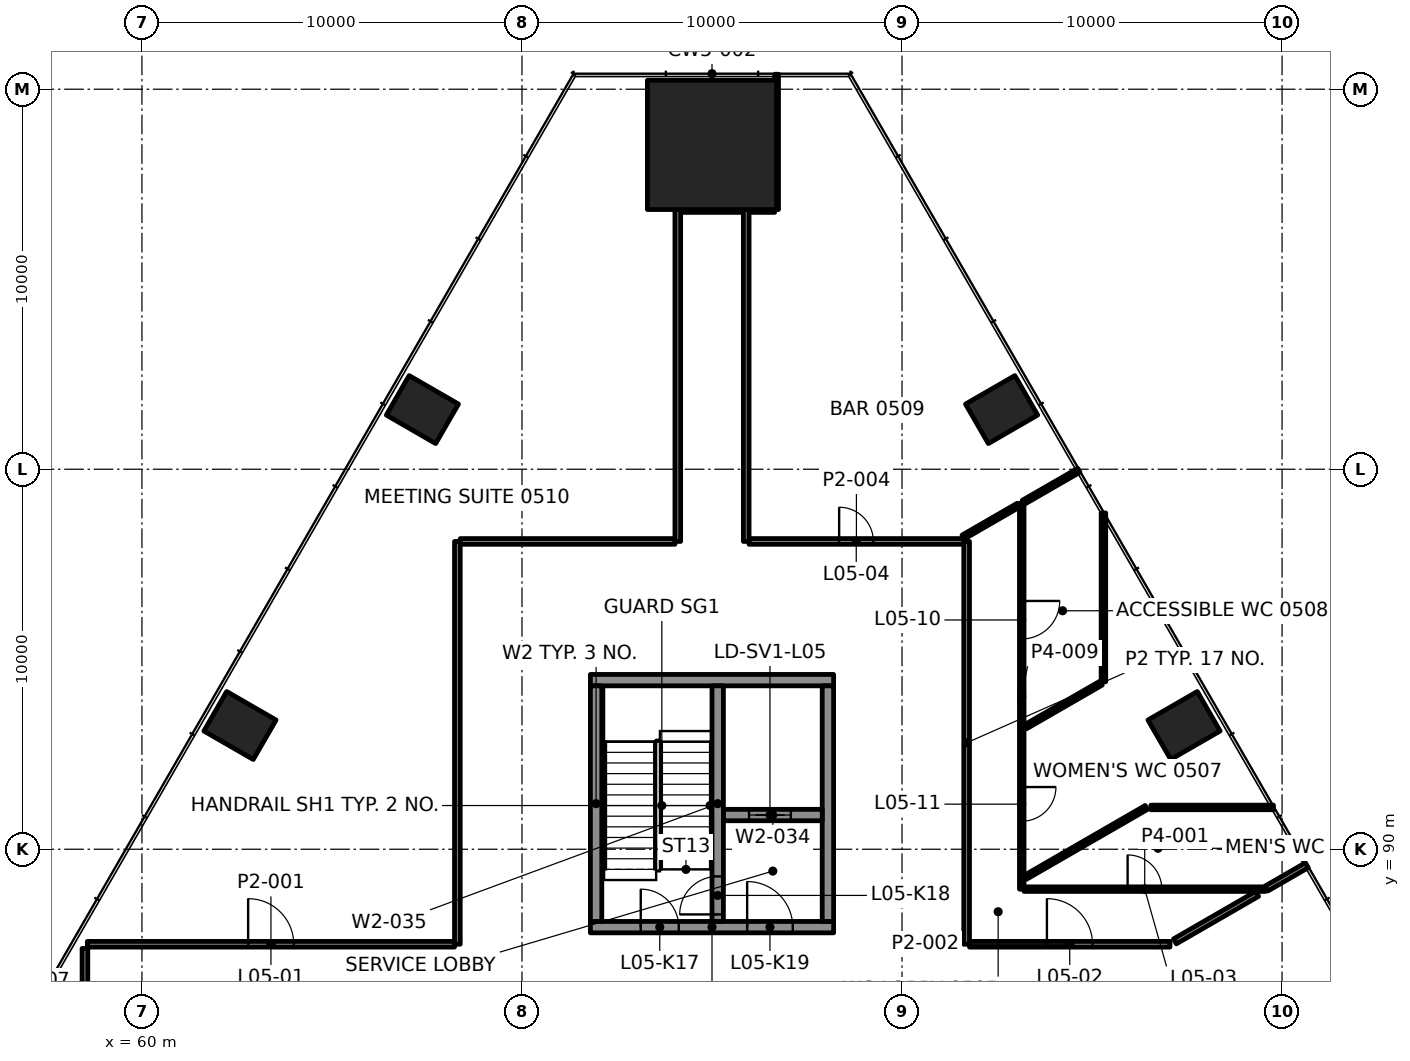
"""IFC4 building model, lengths in metres.
Left out: names, types, materials, properties, quantities, classifications, styles, units other than length and angle.
Written with IfcOpenShell. Run it as: python <this file> out.ifc"""

import sys

from ifc_helpers import new_model, si_unit, direction, frame, frame_2d, origin, origin_2d, place, context, subcontext, project, spatial, rectangle, extrude, element, fill, save


model = new_model("IFC4")
c1 = context("Model", 3, precision=1e-05, world=origin(), true_north=direction((0.0, 1.0)))
c2 = subcontext(c1, "Body", "Model", "MODEL_VIEW")
j1 = project(units=[si_unit("LENGTHUNIT", "METRE"), si_unit("PLANEANGLEUNIT", "RADIAN")], contexts=[c1])
p1 = place(None, origin())
s1 = spatial("IfcSite", under=j1, at=p1, CompositionType="ELEMENT")
p2 = place(p1, origin())
s2 = spatial("IfcBuilding", under=s1, at=p2, CompositionType="ELEMENT")
p3 = place(p2, frame((0.0, 0.0, 26.4)))
s3 = spatial("IfcBuildingStorey", under=s2, at=p3, CompositionType="ELEMENT", Elevation=26.4)
p4 = place(p3, frame((75.0, 108.534, 0.0), z_axis=(0.0, 0.0, 1.0), x_axis=(-1.0, 0.0, 0.0)))
e1 = element("IfcColumn", 1, at=p4, inside=s3, PredefinedType="COLUMN", context=c2, shape_type="SweptSolid", body=[
    extrude(rectangle(XDim=3.4, YDim=3.4, at=origin_2d()), origin(), (0.0, 0.0, 1.0), 4.6),
])
for number, where, z_axis, x_axis in (
    (2, (87.421, 93.256, -0.0), (0.0, 0.0, 1.0), (-0.5, 0.866, 0.0)),
    (3, (82.621, 101.57, -0.0), (0.0, 0.0, 1.0), (-0.5, 0.866, 0.0)),
    (4, (67.379, 101.57, -0.0), (0.0, 0.0, 1.0), (-0.5, -0.866, 0.0)),
    (5, (62.579, 93.256, -0.0), (0.0, 0.0, 1.0), (-0.5, -0.866, 0.0)),
):
    element("IfcColumn", number, at=place(p3, frame(where, z_axis=z_axis, x_axis=x_axis)), inside=s3, PredefinedType="COLUMN", context=c2, shape_type="SweptSolid", body=[
        extrude(rectangle(XDim=1.2, YDim=1.5, at=origin_2d()), origin(), (0.0, 0.0, 1.0), 4.6),
    ])
p5 = place(p3, frame((71.8, 87.95, 0.0), z_axis=(0.0, 0.0, 1.0), x_axis=(1.0, 0.0, 0.0)))
e6 = element("IfcWall", 6, at=p5, inside=s3, PredefinedType="SHEAR", context=c2, shape_type="SweptSolid", body=[
    extrude(rectangle(XDim=6.4, YDim=0.3, at=frame_2d((3.2, 0.0))), origin(), (0.0, 0.0, 1.0), 4.15),
])
p6 = place(p5, frame((1.325, 0.0, 0.0)))
e7 = element("IfcOpeningElement", 7, at=p6, cuts=e6, PredefinedType="OPENING", context=c2, shape_type="SweptSolid", body=[
    extrude(rectangle(XDim=1.0, YDim=2.1, at=frame_2d((0.5, 1.05))), frame((0.0, 0.16, 0.0), z_axis=(0.0, -1.0, 0.0), x_axis=(1.0, 0.0, 0.0)), (0.0, 0.0, 1.0), 0.32),
])
p7 = place(p5, frame((4.125, 0.0, 0.0)))
e8 = element("IfcOpeningElement", 8, at=p7, cuts=e6, PredefinedType="OPENING", context=c2, shape_type="SweptSolid", body=[
    extrude(rectangle(XDim=1.2, YDim=2.1, at=frame_2d((0.6, 1.05))), frame((0.0, 0.16, 0.0), z_axis=(0.0, -1.0, 0.0), x_axis=(1.0, 0.0, 0.0)), (0.0, 0.0, 1.0), 0.32),
])
p8 = place(p3, frame((71.8, 94.45, 0.0), z_axis=(0.0, 0.0, 1.0), x_axis=(1.0, 0.0, 0.0)))
e9 = element("IfcWall", 9, at=p8, inside=s3, PredefinedType="SHEAR", context=c2, shape_type="SweptSolid", body=[
    extrude(rectangle(XDim=6.4, YDim=0.3, at=frame_2d((3.2, 0.0))), origin(), (0.0, 0.0, 1.0), 4.15),
])
for number, where, z_axis, x_axis in (
    (10, (71.95, 88.1, 0.0), (0.0, 0.0, 1.0), (0.0, 1.0, 0.0)),
    (11, (78.05, 88.1, 0.0), (0.0, 0.0, 1.0), (0.0, 1.0, 0.0)),
):
    element("IfcWall", number, at=place(p3, frame(where, z_axis=z_axis, x_axis=x_axis)), inside=s3, PredefinedType="SHEAR", context=c2, shape_type="SweptSolid", body=[
        extrude(rectangle(XDim=6.2, YDim=0.3, at=frame_2d((3.1, 0.0))), origin(), (0.0, 0.0, 1.0), 4.15),
    ])
p9 = place(p3, frame((75.3, 90.9, 0.0), z_axis=(0.0, 0.0, 1.0), x_axis=(1.0, 0.0, 0.0)))
e12 = element("IfcWall", 12, at=p9, inside=s3, PredefinedType="SHEAR", context=c2, shape_type="SweptSolid", body=[
    extrude(rectangle(XDim=2.6, YDim=0.3, at=frame_2d((1.3, 0.0))), origin(), (0.0, 0.0, 1.0), 4.15),
])
p10 = place(p9, frame((0.675, 0.0, 0.0)))
e13 = element("IfcOpeningElement", 13, at=p10, cuts=e12, PredefinedType="OPENING", context=c2, shape_type="SweptSolid", body=[
    extrude(rectangle(XDim=1.1, YDim=2.1, at=frame_2d((0.55, 1.05))), frame((0.0, 0.16, 0.0), z_axis=(0.0, -1.0, 0.0), x_axis=(1.0, 0.0, 0.0)), (0.0, 0.0, 1.0), 0.32),
])
p11 = place(p3, frame((75.15, 88.1, 0.0), z_axis=(0.0, 0.0, 1.0), x_axis=(0.0, 1.0, 0.0)))
e14 = element("IfcWall", 14, at=p11, inside=s3, PredefinedType="SHEAR", context=c2, shape_type="SweptSolid", body=[
    extrude(rectangle(XDim=6.2, YDim=0.3, at=frame_2d((3.1, 0.0))), origin(), (0.0, 0.0, 1.0), 4.15),
])
p12 = place(p11, frame((0.185, 0.0, 0.0)))
e15 = element("IfcOpeningElement", 15, at=p12, cuts=e14, PredefinedType="OPENING", context=c2, shape_type="SweptSolid", body=[
    extrude(rectangle(XDim=1.0, YDim=2.1, at=frame_2d((0.5, 1.05))), frame((0.0, 0.16, 0.0), z_axis=(0.0, -1.0, 0.0), x_axis=(1.0, 0.0, 0.0)), (0.0, 0.0, 1.0), 0.32),
])
p13 = place(p3, frame((58.563, 87.5, 0.0), z_axis=(0.0, 0.0, 1.0), x_axis=(1.0, 0.0, 0.0)))
e16 = element("IfcWall", 16, at=p13, inside=s3, PredefinedType="PARTITIONING", context=c2, shape_type="SweptSolid", body=[
    extrude(rectangle(XDim=9.662, YDim=0.15, at=frame_2d((4.831, 0.0))), origin(), (0.0, 0.0, 1.0), 3.315),
])
p14 = place(p13, frame((4.231, 0.0, 0.0)))
e17 = element("IfcOpeningElement", 17, at=p14, cuts=e16, PredefinedType="OPENING", context=c2, shape_type="SweptSolid", body=[
    extrude(rectangle(XDim=1.2, YDim=2.1, at=frame_2d((0.6, 1.05))), frame((0.0, 0.085, 0.0), z_axis=(0.0, -1.0, 0.0), x_axis=(1.0, 0.0, 0.0)), (0.0, 0.0, 1.0), 0.17),
])
p15 = place(p3, frame((81.775, 87.5, 0.0), z_axis=(0.0, 0.0, 1.0), x_axis=(1.0, 0.0, 0.0)))
e18 = element("IfcWall", 18, at=p15, inside=s3, PredefinedType="PARTITIONING", context=c2, shape_type="SweptSolid", body=[
    extrude(rectangle(XDim=5.276, YDim=0.15, at=frame_2d((2.638, 0.0))), origin(), (0.0, 0.0, 1.0), 3.55),
])
p16 = place(p15, frame((2.038, 0.0, 0.0)))
e19 = element("IfcOpeningElement", 19, at=p16, cuts=e18, PredefinedType="OPENING", context=c2, shape_type="SweptSolid", body=[
    extrude(rectangle(XDim=1.2, YDim=2.1, at=frame_2d((0.6, 1.05))), frame((0.0, 0.085, 0.0), z_axis=(0.0, -1.0, 0.0), x_axis=(1.0, 0.0, 0.0)), (0.0, 0.0, 1.0), 0.17),
])
p17 = place(p3, frame((83.21, 88.95, 0.0), z_axis=(0.0, 0.0, 1.0), x_axis=(1.0, 0.0, 0.0)))
e20 = element("IfcWall", 20, at=p17, inside=s3, PredefinedType="PARTITIONING", context=c2, shape_type="SweptSolid", body=[
    extrude(rectangle(XDim=6.352, YDim=0.12, at=frame_2d((3.176, 0.0))), origin(), (0.0, 0.0, 1.0), 3.55),
])
p18 = place(p17, frame((2.726, 0.0, 0.0)))
e21 = element("IfcOpeningElement", 21, at=p18, cuts=e20, PredefinedType="OPENING", context=c2, shape_type="SweptSolid", body=[
    extrude(rectangle(XDim=0.9, YDim=2.1, at=frame_2d((0.45, 1.05))), frame((0.0, 0.07, 0.0), z_axis=(0.0, -1.0, 0.0), x_axis=(1.0, 0.0, 0.0)), (0.0, 0.0, 1.0), 0.14),
])
p19 = place(p3, frame((86.549, 91.1, 0.0), z_axis=(0.0, 0.0, 1.0), x_axis=(1.0, 0.0, 0.0)))
e22 = element("IfcWall", 22, at=p19, inside=s3, PredefinedType="PARTITIONING", context=c2, shape_type="SweptSolid", body=[
    extrude(rectangle(XDim=3.225, YDim=0.12, at=frame_2d((1.612, 0.0))), origin(), (0.0, 0.0, 1.0), 3.315),
])
p20 = place(p3, frame((68.375, 98.1, 0.0), z_axis=(0.0, 0.0, 1.0), x_axis=(1.0, 0.0, 0.0)))
e23 = element("IfcWall", 23, at=p20, inside=s3, PredefinedType="PARTITIONING", context=c2, shape_type="SweptSolid", body=[
    extrude(rectangle(XDim=5.649, YDim=0.15, at=frame_2d((2.825, 0.0))), origin(), (0.0, 0.0, 1.0), 3.55),
])
p21 = place(p3, frame((75.975, 98.1, 0.0), z_axis=(0.0, 0.0, 1.0), x_axis=(1.0, 0.0, 0.0)))
e24 = element("IfcWall", 24, at=p21, inside=s3, PredefinedType="PARTITIONING", context=c2, shape_type="SweptSolid", body=[
    extrude(rectangle(XDim=5.65, YDim=0.15, at=frame_2d((2.825, 0.0))), origin(), (0.0, 0.0, 1.0), 3.55),
])
p22 = place(p21, frame((2.371, 0.0, 0.0)))
e25 = element("IfcOpeningElement", 25, at=p22, cuts=e24, PredefinedType="OPENING", context=c2, shape_type="SweptSolid", body=[
    extrude(rectangle(XDim=0.9, YDim=2.1, at=frame_2d((0.45, 1.05))), frame((0.0, 0.085, 0.0), z_axis=(0.0, -1.0, 0.0), x_axis=(1.0, 0.0, 0.0)), (0.0, 0.0, 1.0), 0.17),
])
p23 = place(p3, frame((74.176, 106.834, 0.0), z_axis=(0.0, 0.0, 1.0), x_axis=(1.0, 0.0, 0.0)))
e26 = element("IfcWall", 26, at=p23, inside=s3, PredefinedType="PARTITIONING", context=c2, shape_type="SweptSolid", body=[
    extrude(rectangle(XDim=1.649, YDim=0.15, at=frame_2d((0.825, 0.0))), origin(), (0.0, 0.0, 1.0), 3.547),
])
p24 = place(p3, frame((87.18, 87.575, 0.0), z_axis=(0.0, 0.0, 1.0), x_axis=(0.866065245018, 0.499930986609, 0.0)))
e27 = element("IfcWall", 27, at=p24, inside=s3, PredefinedType="PARTITIONING", context=c2, shape_type="SweptSolid", body=[
    extrude(rectangle(XDim=2.5, YDim=0.15, at=frame_2d((1.25, 0.0))), origin(), (0.0, 0.0, 1.0), 3.55),
])
p25 = place(p3, frame((83.245, 89.261, 0.0), z_axis=(0.0, 0.0, 1.0), x_axis=(0.866019716681, 0.500009850223, 0.0)))
e28 = element("IfcWall", 28, at=p25, inside=s3, PredefinedType="PARTITIONING", context=c2, shape_type="SweptSolid", body=[
    extrude(rectangle(XDim=3.677, YDim=0.12, at=frame_2d((1.838, 0.0))), origin(), (0.0, 0.0, 1.0), 3.55),
])
p26 = place(p3, frame((83.245, 93.22, 0.0), z_axis=(0.0, 0.0, 1.0), x_axis=(0.866010893236, 0.500025132165, 0.0)))
e29 = element("IfcWall", 29, at=p26, inside=s3, PredefinedType="PARTITIONING", context=c2, shape_type="SweptSolid", body=[
    extrude(rectangle(XDim=2.304, YDim=0.12, at=frame_2d((1.152, 0.0))), origin(), (0.0, 0.0, 1.0), 3.55),
])
p27 = place(p3, frame((81.61, 98.215, 0.0), z_axis=(0.0, 0.0, 1.0), x_axis=(0.866027799164, 0.499995851058, 0.0)))
e30 = element("IfcWall", 30, at=p27, inside=s3, PredefinedType="PARTITIONING", context=c2, shape_type="SweptSolid", body=[
    extrude(rectangle(XDim=1.675, YDim=0.12, at=frame_2d((0.837, 0.0))), origin(), (0.0, 0.0, 1.0), 3.55),
])
p28 = place(p3, frame((85.3, 94.407, 0.0), z_axis=(0.0, 0.0, 1.0), x_axis=(0.0, 1.0, 0.0)))
e31 = element("IfcWall", 31, at=p28, inside=s3, PredefinedType="PARTITIONING", context=c2, shape_type="SweptSolid", body=[
    extrude(rectangle(XDim=4.442, YDim=0.12, at=frame_2d((2.221, 0.0))), origin(), (0.0, 0.0, 1.0), 3.315),
])
p29 = place(p3, frame((83.15, 99.104, 0.0), z_axis=(0.0, 0.0, 1.0), x_axis=(0.0, -1.0, 0.0)))
e32 = element("IfcWall", 32, at=p29, inside=s3, PredefinedType="PARTITIONING", context=c2, shape_type="SweptSolid", body=[
    extrude(rectangle(XDim=10.155, YDim=0.12, at=frame_2d((5.077, 0.0))), origin(), (0.0, 0.0, 1.0), 3.55),
])
p30 = place(p29, frame((2.571, 0.0, 0.0)))
e33 = element("IfcOpeningElement", 33, at=p30, cuts=e32, PredefinedType="OPENING", context=c2, shape_type="SweptSolid", body=[
    extrude(rectangle(XDim=1.0, YDim=2.1, at=frame_2d((0.5, 1.05))), frame((0.0, 0.07, 0.0), z_axis=(0.0, -1.0, 0.0), x_axis=(1.0, 0.0, 0.0)), (0.0, 0.0, 1.0), 0.14),
])
p31 = place(p29, frame((7.468, 0.0, 0.0)))
e34 = element("IfcOpeningElement", 34, at=p31, cuts=e32, PredefinedType="OPENING", context=c2, shape_type="SweptSolid", body=[
    extrude(rectangle(XDim=0.9, YDim=2.1, at=frame_2d((0.45, 1.05))), frame((0.0, 0.07, 0.0), z_axis=(0.0, -1.0, 0.0), x_axis=(1.0, 0.0, 0.0)), (0.0, 0.0, 1.0), 0.14),
])
p32 = place(p3, frame((81.7, 87.5, 0.0), z_axis=(0.0, 0.0, 1.0), x_axis=(0.0, 1.0, 0.0)))
e35 = element("IfcWall", 35, at=p32, inside=s3, PredefinedType="PARTITIONING", context=c2, shape_type="SweptSolid", body=[
    extrude(rectangle(XDim=10.6, YDim=0.15, at=frame_2d((5.3, 0.0))), origin(), (0.0, 0.0, 1.0), 3.55),
])
p33 = place(p3, frame((76.7, 106.834, 0.0), z_axis=(0.0, 0.0, 1.0), x_axis=(0.0, 1.0, 0.0)))
e36 = element("IfcWall", 36, at=p33, inside=s3, PredefinedType="PARTITIONING", context=c2, shape_type="SweptSolid", body=[
    extrude(rectangle(XDim=3.56, YDim=0.1, at=frame_2d((1.78, 0.0))), origin(), (0.0, 0.0, 1.0), 3.55),
])
p34 = place(p3, frame((75.9, 98.1, 0.0), z_axis=(0.0, 0.0, 1.0), x_axis=(0.0, 1.0, 0.0)))
e37 = element("IfcWall", 37, at=p34, inside=s3, PredefinedType="PARTITIONING", context=c2, shape_type="SweptSolid", body=[
    extrude(rectangle(XDim=8.734, YDim=0.15, at=frame_2d((4.367, 0.0))), origin(), (0.0, 0.0, 1.0), 3.55),
])
p35 = place(p3, frame((74.1, 98.1, 0.0), z_axis=(0.0, 0.0, 1.0), x_axis=(0.0, 1.0, 0.0)))
e38 = element("IfcWall", 38, at=p35, inside=s3, PredefinedType="PARTITIONING", context=c2, shape_type="SweptSolid", body=[
    extrude(rectangle(XDim=8.733, YDim=0.15, at=frame_2d((4.367, 0.0))), origin(), (0.0, 0.0, 1.0), 3.55),
])
p36 = place(p3, frame((68.3, 87.5, 0.0), z_axis=(0.0, 0.0, 1.0), x_axis=(0.0, 1.0, 0.0)))
e39 = element("IfcWall", 39, at=p36, inside=s3, PredefinedType="PARTITIONING", context=c2, shape_type="SweptSolid", body=[
    extrude(rectangle(XDim=10.599, YDim=0.15, at=frame_2d((5.3, 0.0))), origin(), (0.0, 0.0, 1.0), 3.55),
])
p37 = place(p3, frame((58.5, 85.219, 0.0), z_axis=(0.0, 0.0, 1.0), x_axis=(0.0, 1.0, 0.0)))
e40 = element("IfcWall", 40, at=p37, inside=s3, PredefinedType="PARTITIONING", context=c2, shape_type="SweptSolid", body=[
    extrude(rectangle(XDim=2.17, YDim=0.15, at=frame_2d((1.085, 0.0))), origin(), (0.0, 0.0, 1.0), 3.315),
])
p38 = place(p3, frame((89.588, 88.965, 0.0), z_axis=(0.0, 0.0, 1.0), x_axis=(0.865983670182, 0.500072277755, 0.0)))
e41 = element("IfcWall", 41, at=p38, inside=s3, PredefinedType="PARTITIONING", context=c2, shape_type="SweptSolid", body=[
    extrude(rectangle(XDim=1.228, YDim=0.15, at=frame_2d((0.614, 0.0))), origin(), (0.0, 0.0, 1.0), 3.315),
])
p39 = place(p3, frame((75.975, 106.834, 0.0), z_axis=(0.0, 0.0, 1.0), x_axis=(1.0, 0.0, 0.0)))
e42 = element("IfcWall", 42, at=p39, inside=s3, PredefinedType="PARTITIONING", context=c2, shape_type="SweptSolid", body=[
    extrude(rectangle(XDim=0.674, YDim=0.15, at=frame_2d((0.337, 0.0))), origin(), (0.0, 0.0, 1.0), 3.55),
])
p40 = place(p3, frame((83.195, 99.13, 0.0), z_axis=(0.0, 0.0, 1.0), x_axis=(0.865965639045, 0.500103501282, 0.0)))
e43 = element("IfcWall", 43, at=p40, inside=s3, PredefinedType="PARTITIONING", context=c2, shape_type="SweptSolid", body=[
    extrude(rectangle(XDim=1.682, YDim=0.12, at=frame_2d((0.841, 0.0))), origin(), (0.0, 0.0, 1.0), 3.315),
])
p41 = place(p3, frame((107.02, 62.31, 0.0), z_axis=(0.0, 0.0, 1.0), x_axis=(-0.49999992739, 0.866025445706, 0.0)))
e44 = element("IfcWall", 44, at=p41, inside=s3, PredefinedType="PARAPET", context=c2, shape_type="SweptSolid", body=[
    extrude(rectangle(XDim=54.0, YDim=0.2, at=frame_2d((27.0, 0.0))), origin(), (0.0, 0.0, 1.0), 1.1),
])
p42 = place(p3, frame((80.156, 109.038, 0.0), z_axis=(0.0, 0.0, 1.0), x_axis=(0.866024059345, 0.50000232863, 0.0)))
e45 = element("IfcWall", 45, at=p42, inside=s3, PredefinedType="PARAPET", context=c2, shape_type="SweptSolid", body=[
    extrude(rectangle(XDim=29.6, YDim=0.2, at=frame_2d((14.8, 0.0))), origin(), (0.0, 0.0, 1.0), 1.1),
])
p43 = place(p14, origin())
e46 = element("IfcDoor", 46, at=p43, inside=s3, OperationType="DOUBLE_DOOR_SINGLE_SWING", PredefinedType="DOOR", context=c2, shape_type="SweptSolid", body=[
    extrude(rectangle(XDim=1.2, YDim=2.1, at=frame_2d((0.6, 1.05))), frame((0.0, 0.025, 0.0), z_axis=(0.0, -1.0, 0.0), x_axis=(1.0, 0.0, 0.0)), (0.0, 0.0, 1.0), 0.05),
])
fill(e17, e46)
p44 = place(p16, origin())
e47 = element("IfcDoor", 47, at=p44, inside=s3, OperationType="DOUBLE_DOOR_SINGLE_SWING", PredefinedType="DOOR", context=c2, shape_type="SweptSolid", body=[
    extrude(rectangle(XDim=1.2, YDim=2.1, at=frame_2d((0.6, 1.05))), frame((0.0, 0.025, 0.0), z_axis=(0.0, -1.0, 0.0), x_axis=(1.0, 0.0, 0.0)), (0.0, 0.0, 1.0), 0.05),
])
fill(e19, e47)
p45 = place(p18, origin())
e48 = element("IfcDoor", 48, at=p45, inside=s3, OperationType="SINGLE_SWING_LEFT", PredefinedType="DOOR", context=c2, shape_type="SweptSolid", body=[
    extrude(rectangle(XDim=0.9, YDim=2.1, at=frame_2d((0.45, 1.05))), frame((0.0, 0.025, 0.0), z_axis=(0.0, -1.0, 0.0), x_axis=(1.0, 0.0, 0.0)), (0.0, 0.0, 1.0), 0.05),
])
fill(e21, e48)
p46 = place(p22, origin())
e49 = element("IfcDoor", 49, at=p46, inside=s3, OperationType="SINGLE_SWING_RIGHT", PredefinedType="DOOR", context=c2, shape_type="SweptSolid", body=[
    extrude(rectangle(XDim=0.9, YDim=2.1, at=frame_2d((0.45, 1.05))), frame((0.0, 0.025, 0.0), z_axis=(0.0, -1.0, 0.0), x_axis=(1.0, 0.0, 0.0)), (0.0, 0.0, 1.0), 0.05),
])
fill(e25, e49)
p47 = place(p30, origin())
e50 = element("IfcDoor", 50, at=p47, inside=s3, OperationType="SINGLE_SWING_RIGHT", PredefinedType="DOOR", context=c2, shape_type="SweptSolid", body=[
    extrude(rectangle(XDim=1.0, YDim=2.1, at=frame_2d((0.5, 1.05))), frame((0.0, 0.025, 0.0), z_axis=(0.0, -1.0, 0.0), x_axis=(1.0, 0.0, 0.0)), (0.0, 0.0, 1.0), 0.05),
])
fill(e33, e50)
p48 = place(p31, origin())
e51 = element("IfcDoor", 51, at=p48, inside=s3, OperationType="SINGLE_SWING_LEFT", PredefinedType="DOOR", context=c2, shape_type="SweptSolid", body=[
    extrude(rectangle(XDim=0.9, YDim=2.1, at=frame_2d((0.45, 1.05))), frame((0.0, 0.025, 0.0), z_axis=(0.0, -1.0, 0.0), x_axis=(1.0, 0.0, 0.0)), (0.0, 0.0, 1.0), 0.05),
])
fill(e34, e51)
p49 = place(p10, origin())
e52 = element("IfcDoor", 52, at=p49, inside=s3, OperationType="DOUBLE_DOOR_SLIDING", PredefinedType="DOOR", context=c2, shape_type="SweptSolid", body=[
    extrude(rectangle(XDim=1.1, YDim=2.1, at=frame_2d((0.55, 1.05))), frame((0.0, 0.025, 0.0), z_axis=(0.0, -1.0, 0.0), x_axis=(1.0, 0.0, 0.0)), (0.0, 0.0, 1.0), 0.05),
])
fill(e13, e52)
p50 = place(p6, origin())
e53 = element("IfcDoor", 53, at=p50, inside=s3, OperationType="SINGLE_SWING_RIGHT", PredefinedType="DOOR", context=c2, shape_type="SweptSolid", body=[
    extrude(rectangle(XDim=1.0, YDim=2.1, at=frame_2d((0.5, 1.05))), frame((0.0, 0.025, 0.0), z_axis=(0.0, -1.0, 0.0), x_axis=(1.0, 0.0, 0.0)), (0.0, 0.0, 1.0), 0.05),
])
fill(e7, e53)
p51 = place(p12, origin())
e54 = element("IfcDoor", 54, at=p51, inside=s3, OperationType="SINGLE_SWING_LEFT", PredefinedType="DOOR", context=c2, shape_type="SweptSolid", body=[
    extrude(rectangle(XDim=1.0, YDim=2.1, at=frame_2d((0.5, 1.05))), frame((0.0, 0.025, 0.0), z_axis=(0.0, -1.0, 0.0), x_axis=(1.0, 0.0, 0.0)), (0.0, 0.0, 1.0), 0.05),
])
fill(e15, e54)
p52 = place(p7, origin())
e55 = element("IfcDoor", 55, at=p52, inside=s3, OperationType="SINGLE_SWING_RIGHT", PredefinedType="DOOR", context=c2, shape_type="SweptSolid", body=[
    extrude(rectangle(XDim=1.2, YDim=2.1, at=frame_2d((0.6, 1.05))), frame((0.0, 0.025, 0.0), z_axis=(0.0, -1.0, 0.0), x_axis=(1.0, 0.0, 0.0)), (0.0, 0.0, 1.0), 0.05),
])
fill(e8, e55)
p53 = place(p3, frame((0.0, 0.0, -0.3)))
p54 = place(p53, frame((82.279, 108.763, 0.0)))
p55 = place(p54, frame((0.0, 0.0, 0.25)))
e56 = element("IfcDoor", 56, at=p55, inside=s3, OperationType="SINGLE_SWING_LEFT", PredefinedType="TRAPDOOR", context=c2, shape_type="SweptSolid", body=[
    extrude(rectangle(XDim=0.9, YDim=0.9, at=origin_2d()), origin(), (0.0, 0.0, 1.0), 0.05),
])
save(model, sys.argv[1])
